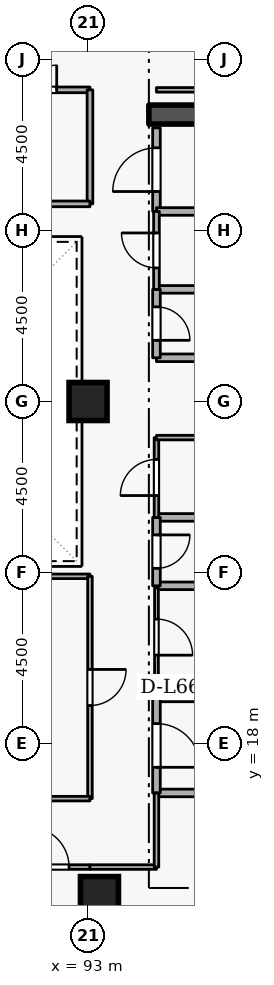
"""IFC4 building model, lengths in metres.
Left out: names, types, materials, properties, quantities, classifications, styles, units other than length and angle.
Written with IfcOpenShell. Run it as: python <this file> out.ifc"""

import sys

from ifc_helpers import new_model, si_unit, direction, frame, frame_2d, origin, origin_2d, place, context, subcontext, project, spatial, rectangle, extrude, element, fill, save


model = new_model("IFC4")
c1 = context("Model", 3, precision=1e-05, world=origin(), true_north=direction((0.0, 1.0)))
c2 = subcontext(c1, "Body", "Model", "MODEL_VIEW")
j1 = project(units=[si_unit("LENGTHUNIT", "METRE"), si_unit("PLANEANGLEUNIT", "RADIAN")], contexts=[c1])
p1 = place(None, origin())
s1 = spatial("IfcSite", under=j1, at=p1, CompositionType="ELEMENT")
p2 = place(p1, origin())
s2 = spatial("IfcBuilding", under=s1, at=p2, CompositionType="ELEMENT")
p3 = place(p2, frame((0.0, 0.0, 247.5)))
s3 = spatial("IfcBuildingStorey", under=s2, at=p3, CompositionType="ELEMENT", Elevation=247.5)
p4 = place(p3, frame((94.6, 34.55, 0.0), z_axis=(0.0, 0.0, 1.0), x_axis=(1.0, 0.0, 0.0)))
e1 = element("IfcWall", 1, at=p4, inside=s3, PredefinedType="SHEAR", context=c2, shape_type="SweptSolid", body=[
    extrude(rectangle(XDim=5.8, YDim=0.5, at=frame_2d((2.9, 0.0))), origin(), (0.0, 0.0, 1.0), 3.6),
])
for number, where, z_axis, x_axis in (
    (2, (93.3, 14.0, 0.0), (0.0, 0.0, 1.0), (1.0, 0.0, 0.0)),
    (3, (93.0, 27.0, 0.0), (0.0, 0.0, 1.0), (1.0, 0.0, 0.0)),
):
    element("IfcColumn", number, at=place(p3, frame(where, z_axis=z_axis, x_axis=x_axis)), inside=s3, PredefinedType="COLUMN", context=c2, shape_type="SweptSolid", body=[
        extrude(rectangle(XDim=1.0, YDim=1.0, at=origin_2d()), origin(), (0.0, 0.0, 1.0), 3.6),
    ])
p5 = place(p3, frame((94.8, 16.7, 0.0), z_axis=(0.0, 0.0, 1.0), x_axis=(1.0, 0.0, 0.0)))
e4 = element("IfcWall", 4, at=p5, inside=s3, PredefinedType="STANDARD", context=c2, shape_type="SweptSolid", body=[
    extrude(rectangle(XDim=5.7, YDim=0.2, at=frame_2d((2.85, 0.0))), origin(), (0.0, 0.0, 1.0), 3.34),
])
p6 = place(p3, frame((97.1, 19.2, 0.0), z_axis=(0.0, 0.0, 1.0), x_axis=(-1.0, 0.0, 0.0)))
e5 = element("IfcWall", 5, at=p6, inside=s3, PredefinedType="STANDARD", context=c2, shape_type="SweptSolid", body=[
    extrude(rectangle(XDim=2.3, YDim=0.2, at=frame_2d((1.15, 0.0))), origin(), (0.0, 0.0, 1.0), 2.545),
])
p7 = place(p3, frame((94.8, 19.2, 0.0), z_axis=(0.0, 0.0, 1.0), x_axis=(0.0, -1.0, 0.0)))
e6 = element("IfcWall", 6, at=p7, inside=s3, PredefinedType="STANDARD", context=c2, shape_type="SweptSolid", body=[
    extrude(rectangle(XDim=2.5, YDim=0.2, at=frame_2d((1.25, 0.0))), origin(), (0.0, 0.0, 1.0), 3.34),
])
p8 = place(p7, frame((0.675, 0.0, 0.0)))
e7 = element("IfcOpeningElement", 7, at=p8, cuts=e6, PredefinedType="OPENING", context=c2, shape_type="SweptSolid", body=[
    extrude(rectangle(XDim=1.15, YDim=2.1, at=frame_2d((0.575, 1.05))), frame((0.0, 0.11, 0.0), z_axis=(0.0, -1.0, 0.0), x_axis=(1.0, 0.0, 0.0)), (0.0, 0.0, 1.0), 0.22),
])
for number, where, z_axis, x_axis in (
    (8, (94.8, 28.15, 0.0), (0.0, 0.0, 1.0), (1.0, 0.0, 0.0)),
    (9, (96.85, 29.95, 0.0), (0.0, 0.0, 1.0), (-1.0, 0.0, 0.0)),
):
    element("IfcWall", number, at=place(p3, frame(where, z_axis=z_axis, x_axis=x_axis)), inside=s3, PredefinedType="STANDARD", context=c2, shape_type="SweptSolid", body=[
        extrude(rectangle(XDim=2.05, YDim=0.2, at=frame_2d((1.025, 0.0))), origin(), (0.0, 0.0, 1.0), 3.34),
    ])
p9 = place(p3, frame((94.8, 29.95, 0.0), z_axis=(0.0, 0.0, 1.0), x_axis=(0.0, -1.0, 0.0)))
e10 = element("IfcWall", 10, at=p9, inside=s3, PredefinedType="STANDARD", context=c2, shape_type="SweptSolid", body=[
    extrude(rectangle(XDim=1.8, YDim=0.2, at=frame_2d((0.9, 0.0))), origin(), (0.0, 0.0, 1.0), 3.34),
])
p10 = place(p9, frame((0.46, 0.0, 0.0)))
e11 = element("IfcOpeningElement", 11, at=p10, cuts=e10, PredefinedType="OPENING", context=c2, shape_type="SweptSolid", body=[
    extrude(rectangle(XDim=0.88, YDim=2.04, at=frame_2d((0.44, 1.02))), frame((0.0, 0.11, 0.0), z_axis=(0.0, -1.0, 0.0), x_axis=(1.0, 0.0, 0.0)), (0.0, 0.0, 1.0), 0.22),
])
for number, where, z_axis, x_axis in (
    (12, (94.8, 22.15, 0.0), (0.0, 0.0, 1.0), (1.0, 0.0, 0.0)),
    (13, (96.85, 23.95, 0.0), (0.0, 0.0, 1.0), (-1.0, 0.0, 0.0)),
):
    element("IfcWall", number, at=place(p3, frame(where, z_axis=z_axis, x_axis=x_axis)), inside=s3, PredefinedType="STANDARD", context=c2, shape_type="SweptSolid", body=[
        extrude(rectangle(XDim=2.05, YDim=0.2, at=frame_2d((1.025, 0.0))), origin(), (0.0, 0.0, 1.0), 3.34),
    ])
p11 = place(p3, frame((94.8, 23.95, 0.0), z_axis=(0.0, 0.0, 1.0), x_axis=(0.0, -1.0, 0.0)))
e14 = element("IfcWall", 14, at=p11, inside=s3, PredefinedType="STANDARD", context=c2, shape_type="SweptSolid", body=[
    extrude(rectangle(XDim=1.8, YDim=0.2, at=frame_2d((0.9, 0.0))), origin(), (0.0, 0.0, 1.0), 3.34),
])
p12 = place(p11, frame((0.46, 0.0, 0.0)))
e15 = element("IfcOpeningElement", 15, at=p12, cuts=e14, PredefinedType="OPENING", context=c2, shape_type="SweptSolid", body=[
    extrude(rectangle(XDim=0.88, YDim=2.04, at=frame_2d((0.44, 1.02))), frame((0.0, 0.11, 0.0), z_axis=(0.0, -1.0, 0.0), x_axis=(1.0, 0.0, 0.0)), (0.0, 0.0, 1.0), 0.22),
])
p13 = place(p3, frame((94.8, 32.0, 0.0), z_axis=(0.0, 0.0, 1.0), x_axis=(0.0, 1.0, 0.0)))
e16 = element("IfcWall", 16, at=p13, inside=s3, PredefinedType="STANDARD", context=c2, shape_type="SweptSolid", body=[
    extrude(rectangle(XDim=2.2, YDim=0.2, at=frame_2d((1.1, 0.0))), origin(), (0.0, 0.0, 1.0), 3.34),
])
p14 = place(p13, frame((0.525, 0.0, 0.0)))
e17 = element("IfcOpeningElement", 17, at=p14, cuts=e16, PredefinedType="OPENING", context=c2, shape_type="SweptSolid", body=[
    extrude(rectangle(XDim=1.15, YDim=2.1, at=frame_2d((0.575, 1.05))), frame((0.0, 0.11, 0.0), z_axis=(0.0, -1.0, 0.0), x_axis=(1.0, 0.0, 0.0)), (0.0, 0.0, 1.0), 0.22),
])
p15 = place(p3, frame((96.85, 32.0, 0.0), z_axis=(0.0, 0.0, 1.0), x_axis=(-1.0, 0.0, 0.0)))
e18 = element("IfcWall", 18, at=p15, inside=s3, PredefinedType="STANDARD", context=c2, shape_type="SweptSolid", body=[
    extrude(rectangle(XDim=2.05, YDim=0.2, at=frame_2d((1.025, 0.0))), origin(), (0.0, 0.0, 1.0), 3.34),
])
p16 = place(p3, frame((94.8, 19.5, 0.0), z_axis=(0.0, 0.0, 1.0), x_axis=(1.0, 0.0, 0.0)))
e19 = element("IfcWall", 19, at=p16, inside=s3, PredefinedType="PARTITIONING", context=c2, shape_type="SweptSolid", body=[
    extrude(rectangle(XDim=2.05, YDim=0.1, at=frame_2d((1.025, 0.0))), origin(), (0.0, 0.0, 1.0), 2.545),
])
p17 = place(p3, frame((94.8, 22.1, 0.0), z_axis=(0.0, 0.0, 1.0), x_axis=(0.0, -1.0, 0.0)))
e20 = element("IfcWall", 20, at=p17, inside=s3, PredefinedType="PARTITIONING", context=c2, shape_type="SweptSolid", body=[
    extrude(rectangle(XDim=2.6, YDim=0.1, at=frame_2d((1.3, 0.0))), origin(), (0.0, 0.0, 1.0), 3.34),
])
p18 = place(p17, frame((0.825, 0.0, 0.0)))
e21 = element("IfcOpeningElement", 21, at=p18, cuts=e20, PredefinedType="OPENING", context=c2, shape_type="SweptSolid", body=[
    extrude(rectangle(XDim=0.95, YDim=2.1, at=frame_2d((0.475, 1.05))), frame((0.0, 0.06, 0.0), z_axis=(0.0, -1.0, 0.0), x_axis=(1.0, 0.0, 0.0)), (0.0, 0.0, 1.0), 0.12),
])
p19 = place(p3, frame((94.8, 23.95, 0.0), z_axis=(0.0, 0.0, 1.0), x_axis=(0.0, 1.0, 0.0)))
e22 = element("IfcWall", 22, at=p19, inside=s3, PredefinedType="PARTITIONING", context=c2, shape_type="SweptSolid", body=[
    extrude(rectangle(XDim=2.1, YDim=0.12, at=frame_2d((1.05, 0.0))), origin(), (0.0, 0.0, 1.0), 3.34),
])
p20 = place(p19, frame((0.575, 0.0, 0.0)))
e23 = element("IfcOpeningElement", 23, at=p20, cuts=e22, PredefinedType="OPENING", context=c2, shape_type="SweptSolid", body=[
    extrude(rectangle(XDim=0.95, YDim=2.1, at=frame_2d((0.475, 1.05))), frame((0.0, 0.07, 0.0), z_axis=(0.0, -1.0, 0.0), x_axis=(1.0, 0.0, 0.0)), (0.0, 0.0, 1.0), 0.14),
])
p21 = place(p3, frame((94.8, 26.05, 0.0), z_axis=(0.0, 0.0, 1.0), x_axis=(1.0, 0.0, 0.0)))
e24 = element("IfcWall", 24, at=p21, inside=s3, PredefinedType="PARTITIONING", context=c2, shape_type="SweptSolid", body=[
    extrude(rectangle(XDim=2.05, YDim=0.12, at=frame_2d((1.025, 0.0))), origin(), (0.0, 0.0, 1.0), 3.34),
])
p22 = place(p3, frame((94.8, 29.95, 0.0), z_axis=(0.0, 0.0, 1.0), x_axis=(0.0, 1.0, 0.0)))
e25 = element("IfcWall", 25, at=p22, inside=s3, PredefinedType="PARTITIONING", context=c2, shape_type="SweptSolid", body=[
    extrude(rectangle(XDim=2.05, YDim=0.15, at=frame_2d((1.025, 0.0))), origin(), (0.0, 0.0, 1.0), 3.34),
])
p23 = place(p22, frame((0.565, 0.0, 0.0)))
e26 = element("IfcOpeningElement", 26, at=p23, cuts=e25, PredefinedType="OPENING", context=c2, shape_type="SweptSolid", body=[
    extrude(rectangle(XDim=0.92, YDim=2.08, at=frame_2d((0.46, 1.04))), frame((0.0, 0.085, 0.0), z_axis=(0.0, -1.0, 0.0), x_axis=(1.0, 0.0, 0.0)), (0.0, 0.0, 1.0), 0.17),
])
p24 = place(p3, frame((94.8, 35.2, 0.0), z_axis=(0.0, 0.0, 1.0), x_axis=(1.0, 0.0, 0.0)))
e27 = element("IfcWall", 27, at=p24, inside=s3, PredefinedType="PARTITIONING", context=c2, shape_type="SweptSolid", body=[
    extrude(rectangle(XDim=5.9, YDim=0.12, at=frame_2d((2.95, 0.0))), origin(), (0.0, 0.0, 1.0), 3.34),
])
p25 = place(p3, frame((90.9, 14.75, 0.0), z_axis=(0.0, 0.0, 1.0), x_axis=(1.0, 0.0, 0.0)))
e28 = element("IfcWall", 28, at=p25, inside=s3, PredefinedType="PARTITIONING", context=c2, shape_type="SweptSolid", body=[
    extrude(rectangle(XDim=2.15, YDim=0.12, at=frame_2d((1.075, 0.0))), origin(), (0.0, 0.0, 1.0), 3.34),
])
p26 = place(p25, frame((0.55, 0.0, 0.0)))
e29 = element("IfcOpeningElement", 29, at=p26, cuts=e28, PredefinedType="OPENING", context=c2, shape_type="SweptSolid", body=[
    extrude(rectangle(XDim=1.05, YDim=2.1, at=frame_2d((0.525, 1.05))), frame((0.0, 0.07, 0.0), z_axis=(0.0, -1.0, 0.0), x_axis=(1.0, 0.0, 0.0)), (0.0, 0.0, 1.0), 0.14),
])
p27 = place(p3, frame((93.05, 14.75, 0.0), z_axis=(0.0, 0.0, 1.0), x_axis=(1.0, 0.0, 0.0)))
e30 = element("IfcWall", 30, at=p27, inside=s3, PredefinedType="PARTITIONING", context=c2, shape_type="SweptSolid", body=[
    extrude(rectangle(XDim=1.75, YDim=0.12, at=frame_2d((0.875, 0.0))), origin(), (0.0, 0.0, 1.0), 3.34),
])
p28 = place(p3, frame((94.8, 14.75, 0.0), z_axis=(0.0, 0.0, 1.0), x_axis=(0.0, 1.0, 0.0)))
e31 = element("IfcWall", 31, at=p28, inside=s3, PredefinedType="PARTITIONING", context=c2, shape_type="SweptSolid", body=[
    extrude(rectangle(XDim=1.95, YDim=0.12, at=frame_2d((0.975, 0.0))), origin(), (0.0, 0.0, 1.0), 3.34),
])
p29 = place(p3, frame((89.3, 22.4, 0.0), z_axis=(0.0, 0.0, 1.0), x_axis=(1.0, 0.0, 0.0)))
e32 = element("IfcWall", 32, at=p29, inside=s3, PredefinedType="PARTITIONING", context=c2, shape_type="SweptSolid", body=[
    extrude(rectangle(XDim=3.75, YDim=0.12, at=frame_2d((1.875, 0.0))), origin(), (0.0, 0.0, 1.0), 3.34),
])
p30 = place(p3, frame((93.05, 22.4, 0.0), z_axis=(0.0, 0.0, 1.0), x_axis=(0.0, -1.0, 0.0)))
e33 = element("IfcWall", 33, at=p30, inside=s3, PredefinedType="PARTITIONING", context=c2, shape_type="SweptSolid", body=[
    extrude(rectangle(XDim=5.85, YDim=0.12, at=frame_2d((2.925, 0.0))), origin(), (0.0, 0.0, 1.0), 3.34),
])
p31 = place(p30, frame((2.45, 0.0, 0.0)))
e34 = element("IfcOpeningElement", 34, at=p31, cuts=e33, PredefinedType="OPENING", context=c2, shape_type="SweptSolid", body=[
    extrude(rectangle(XDim=0.95, YDim=2.1, at=frame_2d((0.475, 1.05))), frame((0.0, 0.07, 0.0), z_axis=(0.0, -1.0, 0.0), x_axis=(1.0, 0.0, 0.0)), (0.0, 0.0, 1.0), 0.14),
])
p32 = place(p3, frame((93.05, 16.55, 0.0), z_axis=(0.0, 0.0, 1.0), x_axis=(-1.0, 0.0, 0.0)))
e35 = element("IfcWall", 35, at=p32, inside=s3, PredefinedType="PARTITIONING", context=c2, shape_type="SweptSolid", body=[
    extrude(rectangle(XDim=3.75, YDim=0.12, at=frame_2d((1.875, 0.0))), origin(), (0.0, 0.0, 1.0), 3.34),
])
p33 = place(p3, frame((90.0, 35.2, 0.0), z_axis=(0.0, 0.0, 1.0), x_axis=(1.0, 0.0, 0.0)))
e36 = element("IfcWall", 36, at=p33, inside=s3, PredefinedType="PARTITIONING", context=c2, shape_type="SweptSolid", body=[
    extrude(rectangle(XDim=3.05, YDim=0.15, at=frame_2d((1.525, 0.0))), origin(), (0.0, 0.0, 1.0), 3.34),
])
p34 = place(p33, frame((0.875, 0.0, 0.0)))
e37 = element("IfcOpeningElement", 37, at=p34, cuts=e36, PredefinedType="OPENING", context=c2, shape_type="SweptSolid", body=[
    extrude(rectangle(XDim=1.3, YDim=2.12, at=frame_2d((0.65, 1.06))), frame((0.0, 0.085, 0.0), z_axis=(0.0, -1.0, 0.0), x_axis=(1.0, 0.0, 0.0)), (0.0, 0.0, 1.0), 0.17),
])
p35 = place(p3, frame((93.05, 35.2, 0.0), z_axis=(0.0, 0.0, 1.0), x_axis=(0.0, -1.0, 0.0)))
e38 = element("IfcWall", 38, at=p35, inside=s3, PredefinedType="PARTITIONING", context=c2, shape_type="SweptSolid", body=[
    extrude(rectangle(XDim=3.0, YDim=0.15, at=frame_2d((1.5, 0.0))), origin(), (0.0, 0.0, 1.0), 3.34),
])
p36 = place(p3, frame((93.05, 32.2, 0.0), z_axis=(0.0, 0.0, 1.0), x_axis=(-1.0, 0.0, 0.0)))
e39 = element("IfcWall", 39, at=p36, inside=s3, PredefinedType="PARTITIONING", context=c2, shape_type="SweptSolid", body=[
    extrude(rectangle(XDim=3.05, YDim=0.15, at=frame_2d((1.525, 0.0))), origin(), (0.0, 0.0, 1.0), 3.34),
])
p37 = place(p8, origin())
e40 = element("IfcDoor", 40, at=p37, inside=s3, OperationType="SINGLE_SWING_RIGHT", PredefinedType="DOOR", context=c2, shape_type="SweptSolid", body=[
    extrude(rectangle(XDim=1.15, YDim=2.1, at=frame_2d((0.575, 1.05))), frame((0.0, 0.025, 0.0), z_axis=(0.0, -1.0, 0.0), x_axis=(1.0, 0.0, 0.0)), (0.0, 0.0, 1.0), 0.05),
])
fill(e7, e40)
p38 = place(p10, origin())
e41 = element("IfcDoor", 41, at=p38, inside=s3, OperationType="SINGLE_SWING_RIGHT", PredefinedType="DOOR", context=c2, shape_type="SweptSolid", body=[
    extrude(rectangle(XDim=0.88, YDim=2.04, at=frame_2d((0.44, 1.02))), frame((0.0, 0.025, 0.0), z_axis=(0.0, -1.0, 0.0), x_axis=(1.0, 0.0, 0.0)), (0.0, 0.0, 1.0), 0.05),
])
fill(e11, e41)
p39 = place(p12, origin())
e42 = element("IfcDoor", 42, at=p39, inside=s3, OperationType="SINGLE_SWING_LEFT", PredefinedType="DOOR", context=c2, shape_type="SweptSolid", body=[
    extrude(rectangle(XDim=0.88, YDim=2.04, at=frame_2d((0.44, 1.02))), frame((0.0, 0.025, 0.0), z_axis=(0.0, -1.0, 0.0), x_axis=(1.0, 0.0, 0.0)), (0.0, 0.0, 1.0), 0.05),
])
fill(e15, e42)
p40 = place(p18, origin())
e43 = element("IfcDoor", 43, at=p40, inside=s3, OperationType="SINGLE_SWING_RIGHT", PredefinedType="DOOR", context=c2, shape_type="SweptSolid", body=[
    extrude(rectangle(XDim=0.95, YDim=2.1, at=frame_2d((0.475, 1.05))), frame((0.0, 0.025, 0.0), z_axis=(0.0, -1.0, 0.0), x_axis=(1.0, 0.0, 0.0)), (0.0, 0.0, 1.0), 0.05),
])
fill(e21, e43)
p41 = place(p20, origin())
e44 = element("IfcDoor", 44, at=p41, inside=s3, OperationType="SINGLE_SWING_LEFT", PredefinedType="DOOR", context=c2, shape_type="SweptSolid", body=[
    extrude(rectangle(XDim=0.95, YDim=2.1, at=frame_2d((0.475, 1.05))), frame((0.0, 0.025, 0.0), z_axis=(0.0, -1.0, 0.0), x_axis=(1.0, 0.0, 0.0)), (0.0, 0.0, 1.0), 0.05),
])
fill(e23, e44)
p42 = place(p23, origin())
e45 = element("IfcDoor", 45, at=p42, inside=s3, OperationType="SINGLE_SWING_RIGHT", PredefinedType="DOOR", context=c2, shape_type="SweptSolid", body=[
    extrude(rectangle(XDim=0.92, YDim=2.08, at=frame_2d((0.46, 1.04))), frame((0.0, 0.025, 0.0), z_axis=(0.0, -1.0, 0.0), x_axis=(1.0, 0.0, 0.0)), (0.0, 0.0, 1.0), 0.05),
])
fill(e26, e45)
p43 = place(p14, origin())
e46 = element("IfcDoor", 46, at=p43, inside=s3, OperationType="SINGLE_SWING_LEFT", PredefinedType="DOOR", context=c2, shape_type="SweptSolid", body=[
    extrude(rectangle(XDim=1.15, YDim=2.1, at=frame_2d((0.575, 1.05))), frame((0.0, 0.025, 0.0), z_axis=(0.0, -1.0, 0.0), x_axis=(1.0, 0.0, 0.0)), (0.0, 0.0, 1.0), 0.05),
])
fill(e17, e46)
p44 = place(p26, origin())
e47 = element("IfcDoor", 47, at=p44, inside=s3, OperationType="SINGLE_SWING_LEFT", PredefinedType="DOOR", context=c2, shape_type="SweptSolid", body=[
    extrude(rectangle(XDim=1.05, YDim=2.1, at=frame_2d((0.525, 1.05))), frame((0.0, 0.025, 0.0), z_axis=(0.0, -1.0, 0.0), x_axis=(1.0, 0.0, 0.0)), (0.0, 0.0, 1.0), 0.05),
])
fill(e29, e47)
p45 = place(p31, origin())
e48 = element("IfcDoor", 48, at=p45, inside=s3, OperationType="SINGLE_SWING_LEFT", PredefinedType="DOOR", context=c2, shape_type="SweptSolid", body=[
    extrude(rectangle(XDim=0.95, YDim=2.1, at=frame_2d((0.475, 1.05))), frame((0.0, 0.025, 0.0), z_axis=(0.0, -1.0, 0.0), x_axis=(1.0, 0.0, 0.0)), (0.0, 0.0, 1.0), 0.05),
])
fill(e34, e48)
p46 = place(p34, origin())
e49 = element("IfcDoor", 49, at=p46, inside=s3, OperationType="DOUBLE_DOOR_SINGLE_SWING", PredefinedType="DOOR", context=c2, shape_type="SweptSolid", body=[
    extrude(rectangle(XDim=1.3, YDim=2.12, at=frame_2d((0.65, 1.06))), frame((0.0, 0.025, 0.0), z_axis=(0.0, -1.0, 0.0), x_axis=(1.0, 0.0, 0.0)), (0.0, 0.0, 1.0), 0.05),
])
fill(e37, e49)
save(model, sys.argv[1])
